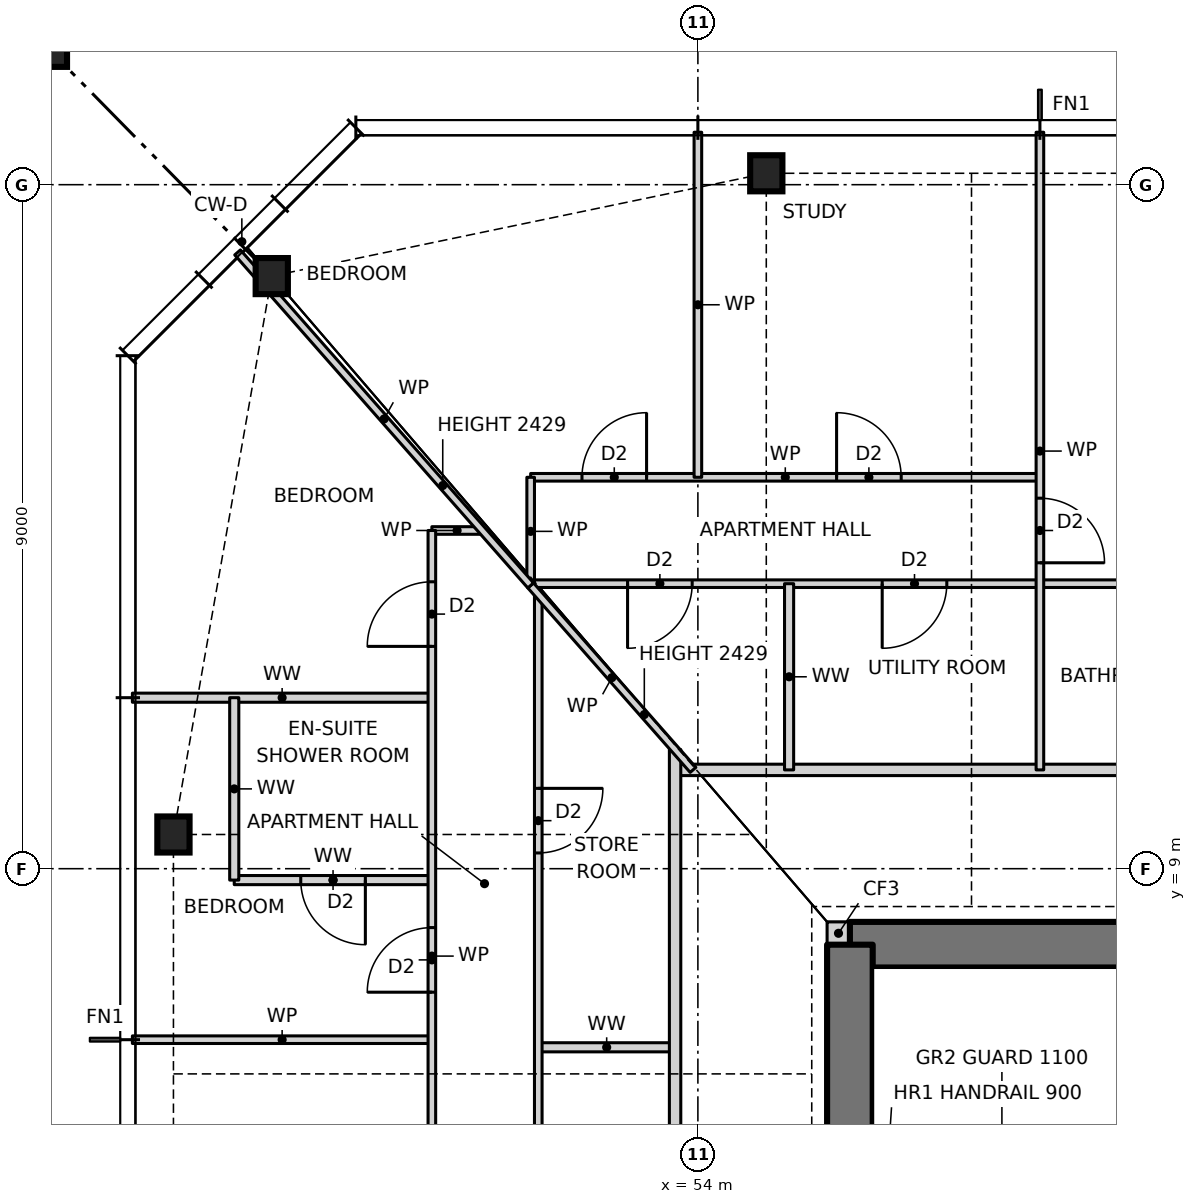
"""IFC4 building model, lengths in metres.
Left out: names, types, materials, properties, quantities, classifications, styles, units other than length and angle.
Written with IfcOpenShell. Run it as: python <this file> out.ifc"""

import sys

from ifc_helpers import new_model, si_unit, direction, frame, frame_2d, origin, origin_2d, place, context, subcontext, project, spatial, rectangle, hollow_rectangle, i_section, extrude, element, fill, save


model = new_model("IFC4")
c1 = context("Model", 3, precision=1e-05, world=origin(), true_north=direction((0.0, 1.0)))
c2 = subcontext(c1, "Body", "Model", "MODEL_VIEW")
j1 = project(units=[si_unit("LENGTHUNIT", "METRE"), si_unit("PLANEANGLEUNIT", "RADIAN")], contexts=[c1])
p1 = place(None, origin())
s1 = spatial("IfcSite", under=j1, at=p1, CompositionType="ELEMENT")
p2 = place(p1, origin())
s2 = spatial("IfcBuilding", under=s1, at=p2, CompositionType="ELEMENT")
p3 = place(p2, frame((0.0, 0.0, 22.0)))
s3 = spatial("IfcBuildingStorey", under=s2, at=p3, CompositionType="ELEMENT", Elevation=22.0)
for number, where, z_axis, x_axis in (
    (1, (54.9, 18.15, 0.0), (0.0, 0.0, 1.0), (1.0, 0.0, 0.0)),
    (2, (48.394, 16.797, 0.0), (0.0, 0.0, 1.0), (1.0, 0.0, 0.0)),
    (3, (47.1, 9.45, 0.0), (0.0, 0.0, 1.0), (1.0, 0.0, 0.0)),
):
    element("IfcColumn", number, at=place(p3, frame(where, z_axis=z_axis, x_axis=x_axis)), inside=s3, PredefinedType="COLUMN", context=c2, shape_type="SweptSolid", body=[
        extrude(i_section(OverallWidth=0.424, OverallDepth=0.475, WebThickness=0.048, FlangeThickness=0.077, at=origin_2d()), origin(), (0.0, 0.0, 1.0), 3.5),
    ])
p4 = place(p3, frame((45.1, 20.15, 0.0), z_axis=(0.0, 0.0, 1.0), x_axis=(1.0, 0.0, 0.0)))
e4 = element("IfcColumn", 4, at=p4, inside=s3, PredefinedType="COLUMN", context=c2, shape_type="SweptSolid", body=[
    extrude(hollow_rectangle(XDim=1.2, YDim=1.2, WallThickness=0.07, at=origin_2d()), origin(), (0.0, 0.0, 1.0), 3.5),
])
p5 = place(p3, frame((55.7, 8.15, 0.0), z_axis=(0.0, 0.0, 1.0), x_axis=(1.0, 0.0, 0.0)))
e5 = element("IfcWall", 5, at=p5, inside=s3, PredefinedType="SOLIDWALL", context=c2, shape_type="SweptSolid", body=[
    extrude(rectangle(XDim=0.3, YDim=0.3, at=frame_2d((0.15, 0.0))), origin(), (0.0, 0.0, 1.0), 3.5),
])
p6 = place(p3, frame((70.0, 8.0, 0.0), z_axis=(0.0, 0.0, 1.0), x_axis=(-1.0, 0.0, 0.0)))
e6 = element("IfcWall", 6, at=p6, inside=s3, PredefinedType="SHEAR", context=c2, shape_type="SweptSolid", body=[
    extrude(rectangle(XDim=14.0, YDim=0.6, at=frame_2d((7.0, 0.0))), origin(), (0.0, 0.0, 1.0), 3.5),
])
p7 = place(p6, frame((8.2, 0.0, 0.0)))
e7 = element("IfcOpeningElement", 7, at=p7, cuts=e6, PredefinedType="OPENING", context=c2, shape_type="SweptSolid", body=[
    extrude(rectangle(XDim=0.9, YDim=2.1, at=frame_2d((0.45, 1.05))), frame((0.0, 0.31, 0.0), z_axis=(0.0, -1.0, 0.0), x_axis=(1.0, 0.0, 0.0)), (0.0, 0.0, 1.0), 0.62),
])
p8 = place(p6, frame((3.2, 0.0, 0.0)))
e8 = element("IfcOpeningElement", 8, at=p8, cuts=e6, PredefinedType="OPENING", context=c2, shape_type="SweptSolid", body=[
    extrude(rectangle(XDim=0.9, YDim=2.1, at=frame_2d((0.45, 1.05))), frame((0.0, 0.31, 0.0), z_axis=(0.0, -1.0, 0.0), x_axis=(1.0, 0.0, 0.0)), (0.0, 0.0, 1.0), 0.62),
])
p9 = place(p3, frame((56.0, 8.0, 0.0), z_axis=(0.0, 0.0, 1.0), x_axis=(0.0, -1.0, 0.0)))
e9 = element("IfcWall", 9, at=p9, inside=s3, PredefinedType="SHEAR", context=c2, shape_type="SweptSolid", body=[
    extrude(rectangle(XDim=16.0, YDim=0.6, at=frame_2d((8.0, 0.0))), origin(), (0.0, 0.0, 1.0), 3.5),
])
p10 = place(p9, frame((7.5, 0.0, 0.0)))
e10 = element("IfcOpeningElement", 10, at=p10, cuts=e9, PredefinedType="OPENING", context=c2, shape_type="SweptSolid", body=[
    extrude(rectangle(XDim=1.0, YDim=2.1, at=frame_2d((0.5, 1.05))), frame((0.0, 0.31, 0.0), z_axis=(0.0, -1.0, 0.0), x_axis=(1.0, 0.0, 0.0)), (0.0, 0.0, 1.0), 0.62),
])
p11 = place(p3, frame((51.9, 6.65, 0.0), z_axis=(0.0, 0.0, 1.0), x_axis=(1.0, 0.0, 0.0)))
e11 = element("IfcWall", 11, at=p11, inside=s3, PredefinedType="PARTITIONING", context=c2, shape_type="SweptSolid", body=[
    extrude(rectangle(XDim=1.8, YDim=0.12, at=frame_2d((0.9, 0.0))), origin(), (0.0, 0.0, 1.0), 3.27),
])
p12 = place(p3, frame((46.56, 6.75, 0.0), z_axis=(0.0, 0.0, 1.0), x_axis=(1.0, 0.0, 0.0)))
e12 = element("IfcWall", 12, at=p12, inside=s3, PredefinedType="PARTITIONING", context=c2, shape_type="SweptSolid", body=[
    extrude(rectangle(XDim=3.94, YDim=0.1, at=frame_2d((1.97, 0.0))), origin(), (0.0, 0.0, 1.0), 3.27),
])
p13 = place(p3, frame((47.9, 8.85, 0.0), z_axis=(0.0, 0.0, 1.0), x_axis=(1.0, 0.0, 0.0)))
e13 = element("IfcWall", 13, at=p13, inside=s3, PredefinedType="PARTITIONING", context=c2, shape_type="SweptSolid", body=[
    extrude(rectangle(XDim=2.6, YDim=0.12, at=frame_2d((1.3, 0.0))), origin(), (0.0, 0.0, 1.0), 3.27),
])
p14 = place(p13, frame((0.875, 0.0, 0.0)))
e14 = element("IfcOpeningElement", 14, at=p14, cuts=e13, PredefinedType="OPENING", context=c2, shape_type="SweptSolid", body=[
    extrude(rectangle(XDim=0.85, YDim=2.1, at=frame_2d((0.425, 1.05))), frame((0.0, 0.07, 0.0), z_axis=(0.0, -1.0, 0.0), x_axis=(1.0, 0.0, 0.0)), (0.0, 0.0, 1.0), 0.14),
])
p15 = place(p3, frame((53.7, 10.3, 0.0), z_axis=(0.0, 0.0, 1.0), x_axis=(1.0, 0.0, 0.0)))
e15 = element("IfcWall", 15, at=p15, inside=s3, PredefinedType="PARTITIONING", context=c2, shape_type="SweptSolid", body=[
    extrude(rectangle(XDim=18.6, YDim=0.15, at=frame_2d((9.3, 0.0))), origin(), (0.0, 0.0, 1.0), 3.27),
])
p16 = place(p15, frame((8.3, 0.0, 0.0)))
e16 = element("IfcOpeningElement", 16, at=p16, cuts=e15, PredefinedType="OPENING", context=c2, shape_type="SweptSolid", body=[
    extrude(rectangle(XDim=1.0, YDim=2.1, at=frame_2d((0.5, 1.05))), frame((0.0, 0.085, 0.0), z_axis=(0.0, -1.0, 0.0), x_axis=(1.0, 0.0, 0.0)), (0.0, 0.0, 1.0), 0.17),
])
p17 = place(p3, frame((46.56, 11.25, 0.0), z_axis=(0.0, 0.0, 1.0), x_axis=(1.0, 0.0, 0.0)))
e17 = element("IfcWall", 17, at=p17, inside=s3, PredefinedType="PARTITIONING", context=c2, shape_type="SweptSolid", body=[
    extrude(rectangle(XDim=3.94, YDim=0.12, at=frame_2d((1.97, 0.0))), origin(), (0.0, 0.0, 1.0), 3.27),
])
p18 = place(p3, frame((51.8, 12.75, 0.0), z_axis=(0.0, 0.0, 1.0), x_axis=(1.0, 0.0, 0.0)))
e18 = element("IfcWall", 18, at=p18, inside=s3, PredefinedType="PARTITIONING", context=c2, shape_type="SweptSolid", body=[
    extrude(rectangle(XDim=22.4, YDim=0.1, at=frame_2d((11.2, 0.0))), origin(), (0.0, 0.0, 1.0), 3.27),
])
p19 = place(p18, frame((13.475, 0.0, 0.0)))
e19 = element("IfcOpeningElement", 19, at=p19, cuts=e18, PredefinedType="OPENING", context=c2, shape_type="SweptSolid", body=[
    extrude(rectangle(XDim=0.85, YDim=2.1, at=frame_2d((0.425, 1.05))), frame((0.0, 0.06, 0.0), z_axis=(0.0, -1.0, 0.0), x_axis=(1.0, 0.0, 0.0)), (0.0, 0.0, 1.0), 0.12),
])
p20 = place(p18, frame((10.275, 0.0, 0.0)))
e20 = element("IfcOpeningElement", 20, at=p20, cuts=e18, PredefinedType="OPENING", context=c2, shape_type="SweptSolid", body=[
    extrude(rectangle(XDim=0.85, YDim=2.1, at=frame_2d((0.425, 1.05))), frame((0.0, 0.06, 0.0), z_axis=(0.0, -1.0, 0.0), x_axis=(1.0, 0.0, 0.0)), (0.0, 0.0, 1.0), 0.12),
])
p21 = place(p18, frame((16.925, 0.0, 0.0)))
e21 = element("IfcOpeningElement", 21, at=p21, cuts=e18, PredefinedType="OPENING", context=c2, shape_type="SweptSolid", body=[
    extrude(rectangle(XDim=0.85, YDim=2.1, at=frame_2d((0.425, 1.05))), frame((0.0, 0.06, 0.0), z_axis=(0.0, -1.0, 0.0), x_axis=(1.0, 0.0, 0.0)), (0.0, 0.0, 1.0), 0.12),
])
p22 = place(p18, frame((20.275, 0.0, 0.0)))
e22 = element("IfcOpeningElement", 22, at=p22, cuts=e18, PredefinedType="OPENING", context=c2, shape_type="SweptSolid", body=[
    extrude(rectangle(XDim=0.85, YDim=2.1, at=frame_2d((0.425, 1.05))), frame((0.0, 0.06, 0.0), z_axis=(0.0, -1.0, 0.0), x_axis=(1.0, 0.0, 0.0)), (0.0, 0.0, 1.0), 0.12),
])
p23 = place(p18, frame((4.625, 0.0, 0.0)))
e23 = element("IfcOpeningElement", 23, at=p23, cuts=e18, PredefinedType="OPENING", context=c2, shape_type="SweptSolid", body=[
    extrude(rectangle(XDim=0.85, YDim=2.1, at=frame_2d((0.425, 1.05))), frame((0.0, 0.06, 0.0), z_axis=(0.0, -1.0, 0.0), x_axis=(1.0, 0.0, 0.0)), (0.0, 0.0, 1.0), 0.12),
])
p24 = place(p18, frame((1.275, 0.0, 0.0)))
e24 = element("IfcOpeningElement", 24, at=p24, cuts=e18, PredefinedType="OPENING", context=c2, shape_type="SweptSolid", body=[
    extrude(rectangle(XDim=0.85, YDim=2.1, at=frame_2d((0.425, 1.05))), frame((0.0, 0.06, 0.0), z_axis=(0.0, -1.0, 0.0), x_axis=(1.0, 0.0, 0.0)), (0.0, 0.0, 1.0), 0.12),
])
p25 = place(p3, frame((50.5, 13.45, 0.0), z_axis=(0.0, 0.0, 1.0), x_axis=(1.0, 0.0, 0.0)))
e25 = element("IfcWall", 25, at=p25, inside=s3, PredefinedType="PARTITIONING", context=c2, shape_type="SweptSolid", body=[
    extrude(rectangle(XDim=0.664, YDim=0.1, at=frame_2d((0.332, 0.0))), origin(), (0.0, 0.0, 1.0), 3.27),
])
p26 = place(p3, frame((51.8, 14.15, 0.0), z_axis=(0.0, 0.0, 1.0), x_axis=(1.0, 0.0, 0.0)))
e26 = element("IfcWall", 26, at=p26, inside=s3, PredefinedType="PARTITIONING", context=c2, shape_type="SweptSolid", body=[
    extrude(rectangle(XDim=6.7, YDim=0.1, at=frame_2d((3.35, 0.0))), origin(), (0.0, 0.0, 1.0), 3.27),
])
p27 = place(p26, frame((4.025, 0.0, 0.0)))
e27 = element("IfcOpeningElement", 27, at=p27, cuts=e26, PredefinedType="OPENING", context=c2, shape_type="SweptSolid", body=[
    extrude(rectangle(XDim=0.85, YDim=2.1, at=frame_2d((0.425, 1.05))), frame((0.0, 0.06, 0.0), z_axis=(0.0, -1.0, 0.0), x_axis=(1.0, 0.0, 0.0)), (0.0, 0.0, 1.0), 0.12),
])
p28 = place(p26, frame((0.675, 0.0, 0.0)))
e28 = element("IfcOpeningElement", 28, at=p28, cuts=e26, PredefinedType="OPENING", context=c2, shape_type="SweptSolid", body=[
    extrude(rectangle(XDim=0.85, YDim=2.1, at=frame_2d((0.425, 1.05))), frame((0.0, 0.06, 0.0), z_axis=(0.0, -1.0, 0.0), x_axis=(1.0, 0.0, 0.0)), (0.0, 0.0, 1.0), 0.12),
])
p29 = place(p3, frame((58.5, 10.3, 0.0), z_axis=(0.0, 0.0, 1.0), x_axis=(0.0, 1.0, 0.0)))
e29 = element("IfcWall", 29, at=p29, inside=s3, PredefinedType="PARTITIONING", context=c2, shape_type="SweptSolid", body=[
    extrude(rectangle(XDim=8.39, YDim=0.1, at=frame_2d((4.195, 0.0))), origin(), (0.0, 0.0, 1.0), 3.27),
])
p30 = place(p29, frame((2.725, 0.0, 0.0)))
e30 = element("IfcOpeningElement", 30, at=p30, cuts=e29, PredefinedType="OPENING", context=c2, shape_type="SweptSolid", body=[
    extrude(rectangle(XDim=0.85, YDim=2.1, at=frame_2d((0.425, 1.05))), frame((0.0, 0.06, 0.0), z_axis=(0.0, -1.0, 0.0), x_axis=(1.0, 0.0, 0.0)), (0.0, 0.0, 1.0), 0.12),
])
p31 = place(p3, frame((55.2, 10.3, 0.0), z_axis=(0.0, 0.0, 1.0), x_axis=(0.0, 1.0, 0.0)))
e31 = element("IfcWall", 31, at=p31, inside=s3, PredefinedType="PARTITIONING", context=c2, shape_type="SweptSolid", body=[
    extrude(rectangle(XDim=2.45, YDim=0.12, at=frame_2d((1.225, 0.0))), origin(), (0.0, 0.0, 1.0), 3.27),
])
p32 = place(p3, frame((54.0, 14.15, 0.0), z_axis=(0.0, 0.0, 1.0), x_axis=(0.0, 1.0, 0.0)))
e32 = element("IfcWall", 32, at=p32, inside=s3, PredefinedType="PARTITIONING", context=c2, shape_type="SweptSolid", body=[
    extrude(rectangle(XDim=4.54, YDim=0.1, at=frame_2d((2.27, 0.0))), origin(), (0.0, 0.0, 1.0), 3.27),
])
p33 = place(p3, frame((53.7, -10.9, 0.0), z_axis=(0.0, 0.0, 1.0), x_axis=(0.0, 1.0, 0.0)))
e33 = element("IfcWall", 33, at=p33, inside=s3, PredefinedType="PARTITIONING", context=c2, shape_type="SweptSolid", body=[
    extrude(rectangle(XDim=21.468, YDim=0.15, at=frame_2d((10.734, 0.0))), origin(), (0.0, 0.0, 1.0), 3.27),
])
p34 = place(p33, frame((7.65, 0.0, 0.0)))
e34 = element("IfcOpeningElement", 34, at=p34, cuts=e33, PredefinedType="OPENING", context=c2, shape_type="SweptSolid", body=[
    extrude(rectangle(XDim=1.0, YDim=2.1, at=frame_2d((0.5, 1.05))), frame((0.0, 0.085, 0.0), z_axis=(0.0, -1.0, 0.0), x_axis=(1.0, 0.0, 0.0)), (0.0, 0.0, 1.0), 0.17),
])
p35 = place(p3, frame((51.9, -12.614, 0.0), z_axis=(0.0, 0.0, 1.0), x_axis=(0.0, 1.0, 0.0)))
e35 = element("IfcWall", 35, at=p35, inside=s3, PredefinedType="PARTITIONING", context=c2, shape_type="SweptSolid", body=[
    extrude(rectangle(XDim=25.228, YDim=0.1, at=frame_2d((12.614, 0.0))), origin(), (0.0, 0.0, 1.0), 3.27),
])
p36 = place(p35, frame((12.639, 0.0, 0.0)))
e36 = element("IfcOpeningElement", 36, at=p36, cuts=e35, PredefinedType="OPENING", context=c2, shape_type="SweptSolid", body=[
    extrude(rectangle(XDim=0.85, YDim=2.1, at=frame_2d((0.425, 1.05))), frame((0.0, 0.06, 0.0), z_axis=(0.0, -1.0, 0.0), x_axis=(1.0, 0.0, 0.0)), (0.0, 0.0, 1.0), 0.12),
])
p37 = place(p35, frame((9.439, 0.0, 0.0)))
e37 = element("IfcOpeningElement", 37, at=p37, cuts=e35, PredefinedType="OPENING", context=c2, shape_type="SweptSolid", body=[
    extrude(rectangle(XDim=0.85, YDim=2.1, at=frame_2d((0.425, 1.05))), frame((0.0, 0.06, 0.0), z_axis=(0.0, -1.0, 0.0), x_axis=(1.0, 0.0, 0.0)), (0.0, 0.0, 1.0), 0.12),
])
p38 = place(p35, frame((16.639, 0.0, 0.0)))
e38 = element("IfcOpeningElement", 38, at=p38, cuts=e35, PredefinedType="OPENING", context=c2, shape_type="SweptSolid", body=[
    extrude(rectangle(XDim=0.85, YDim=2.1, at=frame_2d((0.425, 1.05))), frame((0.0, 0.06, 0.0), z_axis=(0.0, -1.0, 0.0), x_axis=(1.0, 0.0, 0.0)), (0.0, 0.0, 1.0), 0.12),
])
p39 = place(p35, frame((21.821, 0.0, 0.0)))
e39 = element("IfcOpeningElement", 39, at=p39, cuts=e35, PredefinedType="OPENING", context=c2, shape_type="SweptSolid", body=[
    extrude(rectangle(XDim=0.85, YDim=2.1, at=frame_2d((0.425, 1.05))), frame((0.0, 0.06, 0.0), z_axis=(0.0, -1.0, 0.0), x_axis=(1.0, 0.0, 0.0)), (0.0, 0.0, 1.0), 0.12),
])
p40 = place(p35, frame((2.507, 0.0, 0.0)))
e40 = element("IfcOpeningElement", 40, at=p40, cuts=e35, PredefinedType="OPENING", context=c2, shape_type="SweptSolid", body=[
    extrude(rectangle(XDim=0.85, YDim=2.1, at=frame_2d((0.425, 1.05))), frame((0.0, 0.06, 0.0), z_axis=(0.0, -1.0, 0.0), x_axis=(1.0, 0.0, 0.0)), (0.0, 0.0, 1.0), 0.12),
])
p41 = place(p3, frame((51.8, 12.727, 0.0), z_axis=(0.0, 0.0, 1.0), x_axis=(0.0, 1.0, 0.0)))
e41 = element("IfcWall", 41, at=p41, inside=s3, PredefinedType="PARTITIONING", context=c2, shape_type="SweptSolid", body=[
    extrude(rectangle(XDim=1.423, YDim=0.1, at=frame_2d((0.711, 0.0))), origin(), (0.0, 0.0, 1.0), 3.27),
])
p42 = place(p3, frame((50.5, 2.25, 0.0), z_axis=(0.0, 0.0, 1.0), x_axis=(0.0, 1.0, 0.0)))
e42 = element("IfcWall", 42, at=p42, inside=s3, PredefinedType="PARTITIONING", context=c2, shape_type="SweptSolid", body=[
    extrude(rectangle(XDim=11.2, YDim=0.1, at=frame_2d((5.6, 0.0))), origin(), (0.0, 0.0, 1.0), 3.27),
])
p43 = place(p42, frame((1.825, 0.0, 0.0)))
e43 = element("IfcOpeningElement", 43, at=p43, cuts=e42, PredefinedType="OPENING", context=c2, shape_type="SweptSolid", body=[
    extrude(rectangle(XDim=0.85, YDim=2.1, at=frame_2d((0.425, 1.05))), frame((0.0, 0.06, 0.0), z_axis=(0.0, -1.0, 0.0), x_axis=(1.0, 0.0, 0.0)), (0.0, 0.0, 1.0), 0.12),
])
p44 = place(p42, frame((5.125, 0.0, 0.0)))
e44 = element("IfcOpeningElement", 44, at=p44, cuts=e42, PredefinedType="OPENING", context=c2, shape_type="SweptSolid", body=[
    extrude(rectangle(XDim=0.85, YDim=2.1, at=frame_2d((0.425, 1.05))), frame((0.0, 0.06, 0.0), z_axis=(0.0, -1.0, 0.0), x_axis=(1.0, 0.0, 0.0)), (0.0, 0.0, 1.0), 0.12),
])
p45 = place(p42, frame((9.675, 0.0, 0.0)))
e45 = element("IfcOpeningElement", 45, at=p45, cuts=e42, PredefinedType="OPENING", context=c2, shape_type="SweptSolid", body=[
    extrude(rectangle(XDim=0.85, YDim=2.1, at=frame_2d((0.425, 1.05))), frame((0.0, 0.06, 0.0), z_axis=(0.0, -1.0, 0.0), x_axis=(1.0, 0.0, 0.0)), (0.0, 0.0, 1.0), 0.12),
])
p46 = place(p3, frame((47.9, 8.85, 0.0), z_axis=(0.0, 0.0, 1.0), x_axis=(0.0, 1.0, 0.0)))
e46 = element("IfcWall", 46, at=p46, inside=s3, PredefinedType="PARTITIONING", context=c2, shape_type="SweptSolid", body=[
    extrude(rectangle(XDim=2.4, YDim=0.12, at=frame_2d((1.2, 0.0))), origin(), (0.0, 0.0, 1.0), 3.27),
])
p47 = place(p3, frame((53.936, 10.3, 0.0), z_axis=(0.0, 0.0, 1.0), x_axis=(-0.660667046586, 0.75067906162, 0.0)))
e47 = element("IfcWall", 47, at=p47, inside=s3, PredefinedType="PARTITIONING", context=c2, shape_type="SweptSolid", body=[
    extrude(rectangle(XDim=3.233, YDim=0.1, at=frame_2d((1.617, 0.0))), origin(), (0.0, 0.0, 1.0), 2.429),
])
p48 = place(p3, frame((51.8, 12.727, 0.0), z_axis=(0.0, 0.0, 1.0), x_axis=(-0.660690123093, 0.750658751529, 0.0)))
e48 = element("IfcWall", 48, at=p48, inside=s3, PredefinedType="PARTITIONING", context=c2, shape_type="SweptSolid", body=[
    extrude(rectangle(XDim=5.837, YDim=0.1, at=frame_2d((2.918, 0.0))), origin(), (0.0, 0.0, 1.0), 2.429),
])
p49 = place(p30, frame((0.85, 0.0, 0.0), z_axis=(0.0, 0.0, 1.0), x_axis=(-1.0, 0.0, 0.0)))
e49 = element("IfcDoor", 49, at=p49, inside=s3, OperationType="SINGLE_SWING_RIGHT", PredefinedType="DOOR", context=c2, shape_type="SweptSolid", body=[
    extrude(rectangle(XDim=0.85, YDim=2.1, at=frame_2d((0.425, 1.05))), frame((0.0, 0.025, 0.0), z_axis=(0.0, -1.0, 0.0), x_axis=(1.0, 0.0, 0.0)), (0.0, 0.0, 1.0), 0.05),
])
fill(e30, e49)
p50 = place(p27, origin())
e50 = element("IfcDoor", 50, at=p50, inside=s3, OperationType="SINGLE_SWING_LEFT", PredefinedType="DOOR", context=c2, shape_type="SweptSolid", body=[
    extrude(rectangle(XDim=0.85, YDim=2.1, at=frame_2d((0.425, 1.05))), frame((0.0, 0.025, 0.0), z_axis=(0.0, -1.0, 0.0), x_axis=(1.0, 0.0, 0.0)), (0.0, 0.0, 1.0), 0.05),
])
fill(e27, e50)
p51 = place(p28, origin())
e51 = element("IfcDoor", 51, at=p51, inside=s3, OperationType="SINGLE_SWING_RIGHT", PredefinedType="DOOR", context=c2, shape_type="SweptSolid", body=[
    extrude(rectangle(XDim=0.85, YDim=2.1, at=frame_2d((0.425, 1.05))), frame((0.0, 0.025, 0.0), z_axis=(0.0, -1.0, 0.0), x_axis=(1.0, 0.0, 0.0)), (0.0, 0.0, 1.0), 0.05),
])
fill(e28, e51)
p52 = place(p23, frame((0.85, 0.0, 0.0), z_axis=(0.0, 0.0, 1.0), x_axis=(-1.0, 0.0, 0.0)))
e52 = element("IfcDoor", 52, at=p52, inside=s3, OperationType="SINGLE_SWING_RIGHT", PredefinedType="DOOR", context=c2, shape_type="SweptSolid", body=[
    extrude(rectangle(XDim=0.85, YDim=2.1, at=frame_2d((0.425, 1.05))), frame((0.0, 0.025, 0.0), z_axis=(0.0, -1.0, 0.0), x_axis=(1.0, 0.0, 0.0)), (0.0, 0.0, 1.0), 0.05),
])
fill(e23, e52)
p53 = place(p24, frame((0.85, 0.0, 0.0), z_axis=(0.0, 0.0, 1.0), x_axis=(-1.0, 0.0, 0.0)))
e53 = element("IfcDoor", 53, at=p53, inside=s3, OperationType="SINGLE_SWING_RIGHT", PredefinedType="DOOR", context=c2, shape_type="SweptSolid", body=[
    extrude(rectangle(XDim=0.85, YDim=2.1, at=frame_2d((0.425, 1.05))), frame((0.0, 0.025, 0.0), z_axis=(0.0, -1.0, 0.0), x_axis=(1.0, 0.0, 0.0)), (0.0, 0.0, 1.0), 0.05),
])
fill(e24, e53)
p54 = place(p14, frame((0.85, 0.0, 0.0), z_axis=(0.0, 0.0, 1.0), x_axis=(-1.0, 0.0, 0.0)))
e54 = element("IfcDoor", 54, at=p54, inside=s3, OperationType="SINGLE_SWING_LEFT", PredefinedType="DOOR", context=c2, shape_type="SweptSolid", body=[
    extrude(rectangle(XDim=0.85, YDim=2.1, at=frame_2d((0.425, 1.05))), frame((0.0, 0.025, 0.0), z_axis=(0.0, -1.0, 0.0), x_axis=(1.0, 0.0, 0.0)), (0.0, 0.0, 1.0), 0.05),
])
fill(e14, e54)
p55 = place(p44, origin())
e55 = element("IfcDoor", 55, at=p55, inside=s3, OperationType="SINGLE_SWING_LEFT", PredefinedType="DOOR", context=c2, shape_type="SweptSolid", body=[
    extrude(rectangle(XDim=0.85, YDim=2.1, at=frame_2d((0.425, 1.05))), frame((0.0, 0.025, 0.0), z_axis=(0.0, -1.0, 0.0), x_axis=(1.0, 0.0, 0.0)), (0.0, 0.0, 1.0), 0.05),
])
fill(e44, e55)
p56 = place(p45, origin())
e56 = element("IfcDoor", 56, at=p56, inside=s3, OperationType="SINGLE_SWING_LEFT", PredefinedType="DOOR", context=c2, shape_type="SweptSolid", body=[
    extrude(rectangle(XDim=0.85, YDim=2.1, at=frame_2d((0.425, 1.05))), frame((0.0, 0.025, 0.0), z_axis=(0.0, -1.0, 0.0), x_axis=(1.0, 0.0, 0.0)), (0.0, 0.0, 1.0), 0.05),
])
fill(e45, e56)
p57 = place(p39, frame((0.85, 0.0, 0.0), z_axis=(0.0, 0.0, 1.0), x_axis=(-1.0, 0.0, 0.0)))
e57 = element("IfcDoor", 57, at=p57, inside=s3, OperationType="SINGLE_SWING_LEFT", PredefinedType="DOOR", context=c2, shape_type="SweptSolid", body=[
    extrude(rectangle(XDim=0.85, YDim=2.1, at=frame_2d((0.425, 1.05))), frame((0.0, 0.025, 0.0), z_axis=(0.0, -1.0, 0.0), x_axis=(1.0, 0.0, 0.0)), (0.0, 0.0, 1.0), 0.05),
])
fill(e39, e57)
save(model, sys.argv[1])
